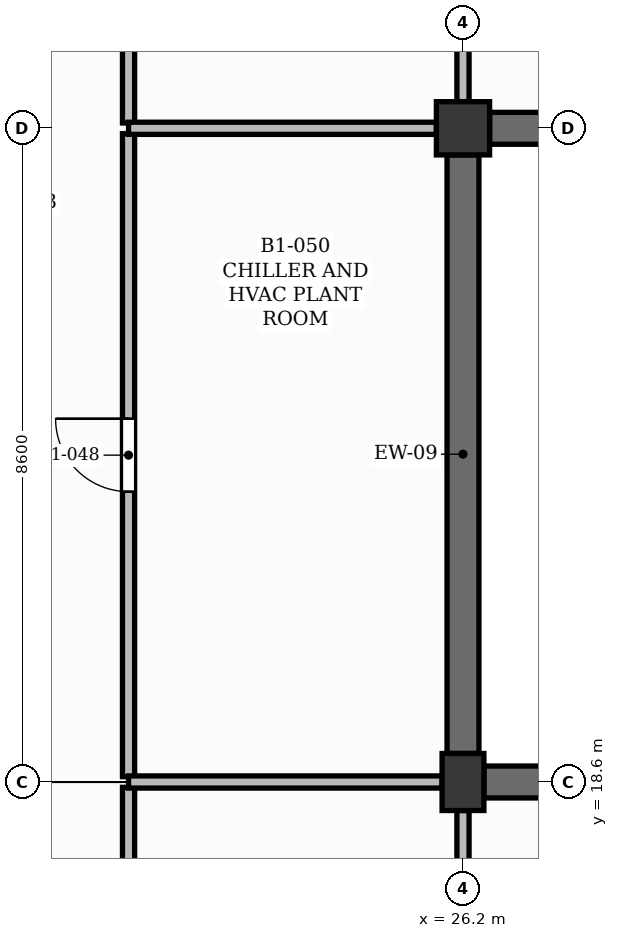
"""IFC4 building model, lengths in metres.
Left out: names, types, materials, properties, quantities, classifications, styles, units other than length and angle.
Written with IfcOpenShell. Run it as: python <this file> out.ifc"""

import sys

from ifc_helpers import new_model, si_unit, direction, frame, frame_2d, origin, origin_2d, place, context, subcontext, project, spatial, rectangle, extrude, element, fill, save


model = new_model("IFC4")
c1 = context("Model", 3, precision=1e-05, world=origin(), true_north=direction((0.0, 1.0)))
c2 = subcontext(c1, "Body", "Model", "MODEL_VIEW")
j1 = project(units=[si_unit("LENGTHUNIT", "METRE"), si_unit("PLANEANGLEUNIT", "RADIAN")], contexts=[c1])
p1 = place(None, origin())
s1 = spatial("IfcSite", under=j1, at=p1, CompositionType="ELEMENT")
p2 = place(p1, origin())
s2 = spatial("IfcBuilding", under=s1, at=p2, CompositionType="ELEMENT")
p3 = place(p2, frame((0.0, 0.0, -4.5)))
s3 = spatial("IfcBuildingStorey", under=s2, at=p3, CompositionType="ELEMENT", Elevation=-4.5)
p4 = place(p3, frame((26.2, 18.6, 0.0), z_axis=(0.0, 0.0, 1.0), x_axis=(1.0, 0.0, 0.0)))
e1 = element("IfcColumn", 1, at=p4, inside=s3, PredefinedType="COLUMN", context=c2, shape_type="SweptSolid", body=[
    extrude(rectangle(XDim=0.55, YDim=0.75, at=origin_2d()), origin(), (0.0, 0.0, 1.0), 4.2),
])
p5 = place(p3, frame((26.2, 27.2, 0.0), z_axis=(0.0, 0.0, 1.0), x_axis=(1.0, 0.0, 0.0)))
e2 = element("IfcColumn", 2, at=p5, inside=s3, PredefinedType="COLUMN", context=c2, shape_type="SweptSolid", body=[
    extrude(rectangle(XDim=0.7, YDim=0.7, at=origin_2d()), origin(), (0.0, 0.0, 1.0), 4.2),
])
p6 = place(p3, frame((26.2, 18.975, 0.0), z_axis=(0.0, 0.0, 1.0), x_axis=(0.0, 1.0, 0.0)))
e3 = element("IfcWall", 3, at=p6, inside=s3, PredefinedType="USERDEFINED", context=c2, shape_type="SweptSolid", body=[
    extrude(rectangle(XDim=7.875, YDim=0.42, at=frame_2d((3.938, 0.0))), origin(), (0.0, 0.0, 1.0), 4.2),
])
p7 = place(p3, frame((26.475, 18.6, 0.0), z_axis=(0.0, 0.0, 1.0), x_axis=(1.0, 0.0, 0.0)))
e4 = element("IfcWall", 4, at=p7, inside=s3, PredefinedType="USERDEFINED", context=c2, shape_type="SweptSolid", body=[
    extrude(rectangle(XDim=6.575, YDim=0.42, at=frame_2d((3.288, 0.0))), origin(), (0.0, 0.0, 1.0), 4.2),
])
p8 = place(p3, frame((26.55, 27.2, 0.0), z_axis=(0.0, 0.0, 1.0), x_axis=(1.0, 0.0, 0.0)))
e5 = element("IfcWall", 5, at=p8, inside=s3, PredefinedType="USERDEFINED", context=c2, shape_type="SweptSolid", body=[
    extrude(rectangle(XDim=6.525, YDim=0.42, at=frame_2d((3.262, 0.0))), origin(), (0.0, 0.0, 1.0), 4.2),
])
p9 = place(p3, frame((21.8, 13.47, 0.0), z_axis=(0.0, 0.0, 1.0), x_axis=(0.0, 1.0, 0.0)))
e6 = element("IfcWall", 6, at=p9, inside=s3, PredefinedType="PARTITIONING", context=c2, shape_type="SweptSolid", body=[
    extrude(rectangle(XDim=5.06, YDim=0.16, at=frame_2d((2.53, 0.0))), origin(), (0.0, 0.0, 1.0), 4.08),
])
p10 = place(p9, frame((2.05, 0.0, 0.0)))
e7 = element("IfcOpeningElement", 7, at=p10, cuts=e6, PredefinedType="OPENING", context=c2, shape_type="SweptSolid", body=[
    extrude(rectangle(XDim=0.96, YDim=2.1, at=frame_2d((0.48, 1.05))), frame((0.0, 0.09, 0.0), z_axis=(0.0, -1.0, 0.0), x_axis=(1.0, 0.0, 0.0)), (0.0, 0.0, 1.0), 0.18),
])
p11 = place(p3, frame((21.8, 18.67, 0.0), z_axis=(0.0, 0.0, 1.0), x_axis=(0.0, 1.0, 0.0)))
e8 = element("IfcWall", 8, at=p11, inside=s3, PredefinedType="PARTITIONING", context=c2, shape_type="SweptSolid", body=[
    extrude(rectangle(XDim=8.46, YDim=0.16, at=frame_2d((4.23, 0.0))), origin(), (0.0, 0.0, 1.0), 4.08),
])
p12 = place(p11, frame((3.75, 0.0, 0.0)))
e9 = element("IfcOpeningElement", 9, at=p12, cuts=e8, PredefinedType="OPENING", context=c2, shape_type="SweptSolid", body=[
    extrude(rectangle(XDim=0.96, YDim=2.1, at=frame_2d((0.48, 1.05))), frame((0.0, 0.09, 0.0), z_axis=(0.0, -1.0, 0.0), x_axis=(1.0, 0.0, 0.0)), (0.0, 0.0, 1.0), 0.18),
])
p13 = place(p3, frame((21.8, 18.6, 0.0), z_axis=(0.0, 0.0, 1.0), x_axis=(1.0, 0.0, 0.0)))
e10 = element("IfcWall", 10, at=p13, inside=s3, PredefinedType="PARTITIONING", context=c2, shape_type="SweptSolid", body=[
    extrude(rectangle(XDim=4.125, YDim=0.16, at=frame_2d((2.062, 0.0))), origin(), (0.0, 0.0, 1.0), 3.5),
])
p14 = place(p3, frame((21.8, 27.27, 0.0), z_axis=(0.0, 0.0, 1.0), x_axis=(0.0, 1.0, 0.0)))
e11 = element("IfcWall", 11, at=p14, inside=s3, PredefinedType="PARTITIONING", context=c2, shape_type="SweptSolid", body=[
    extrude(rectangle(XDim=3.06, YDim=0.16, at=frame_2d((1.53, 0.0))), origin(), (0.0, 0.0, 1.0), 4.08),
])
p15 = place(p14, frame((1.05, 0.0, 0.0)))
e12 = element("IfcOpeningElement", 12, at=p15, cuts=e11, PredefinedType="OPENING", context=c2, shape_type="SweptSolid", body=[
    extrude(rectangle(XDim=0.96, YDim=2.1, at=frame_2d((0.48, 1.05))), frame((0.0, 0.09, 0.0), z_axis=(0.0, -1.0, 0.0), x_axis=(1.0, 0.0, 0.0)), (0.0, 0.0, 1.0), 0.18),
])
p16 = place(p3, frame((21.8, 27.2, 0.0), z_axis=(0.0, 0.0, 1.0), x_axis=(1.0, 0.0, 0.0)))
e13 = element("IfcWall", 13, at=p16, inside=s3, PredefinedType="PARTITIONING", context=c2, shape_type="SweptSolid", body=[
    extrude(rectangle(XDim=4.05, YDim=0.16, at=frame_2d((2.025, 0.0))), origin(), (0.0, 0.0, 1.0), 3.6),
])
p17 = place(p3, frame((26.2, 13.47, 0.0), z_axis=(0.0, 0.0, 1.0), x_axis=(0.0, 1.0, 0.0)))
e14 = element("IfcWall", 14, at=p17, inside=s3, PredefinedType="PARTITIONING", context=c2, shape_type="SweptSolid", body=[
    extrude(rectangle(XDim=4.755, YDim=0.16, at=frame_2d((2.377, 0.0))), origin(), (0.0, 0.0, 1.0), 3.5),
])
p18 = place(p3, frame((26.2, 27.55, 0.0), z_axis=(0.0, 0.0, 1.0), x_axis=(0.0, 1.0, 0.0)))
e15 = element("IfcWall", 15, at=p18, inside=s3, PredefinedType="PARTITIONING", context=c2, shape_type="SweptSolid", body=[
    extrude(rectangle(XDim=2.78, YDim=0.16, at=frame_2d((1.39, 0.0))), origin(), (0.0, 0.0, 1.0), 3.4),
])
p19 = place(p12, origin())
e16 = element("IfcDoor", 16, at=p19, inside=s3, OperationType="SINGLE_SWING_RIGHT", PredefinedType="DOOR", context=c2, shape_type="SweptSolid", body=[
    extrude(rectangle(XDim=0.96, YDim=2.1, at=frame_2d((0.48, 1.05))), frame((0.0, 0.025, 0.0), z_axis=(0.0, -1.0, 0.0), x_axis=(1.0, 0.0, 0.0)), (0.0, 0.0, 1.0), 0.05),
])
fill(e9, e16)
save(model, sys.argv[1])
